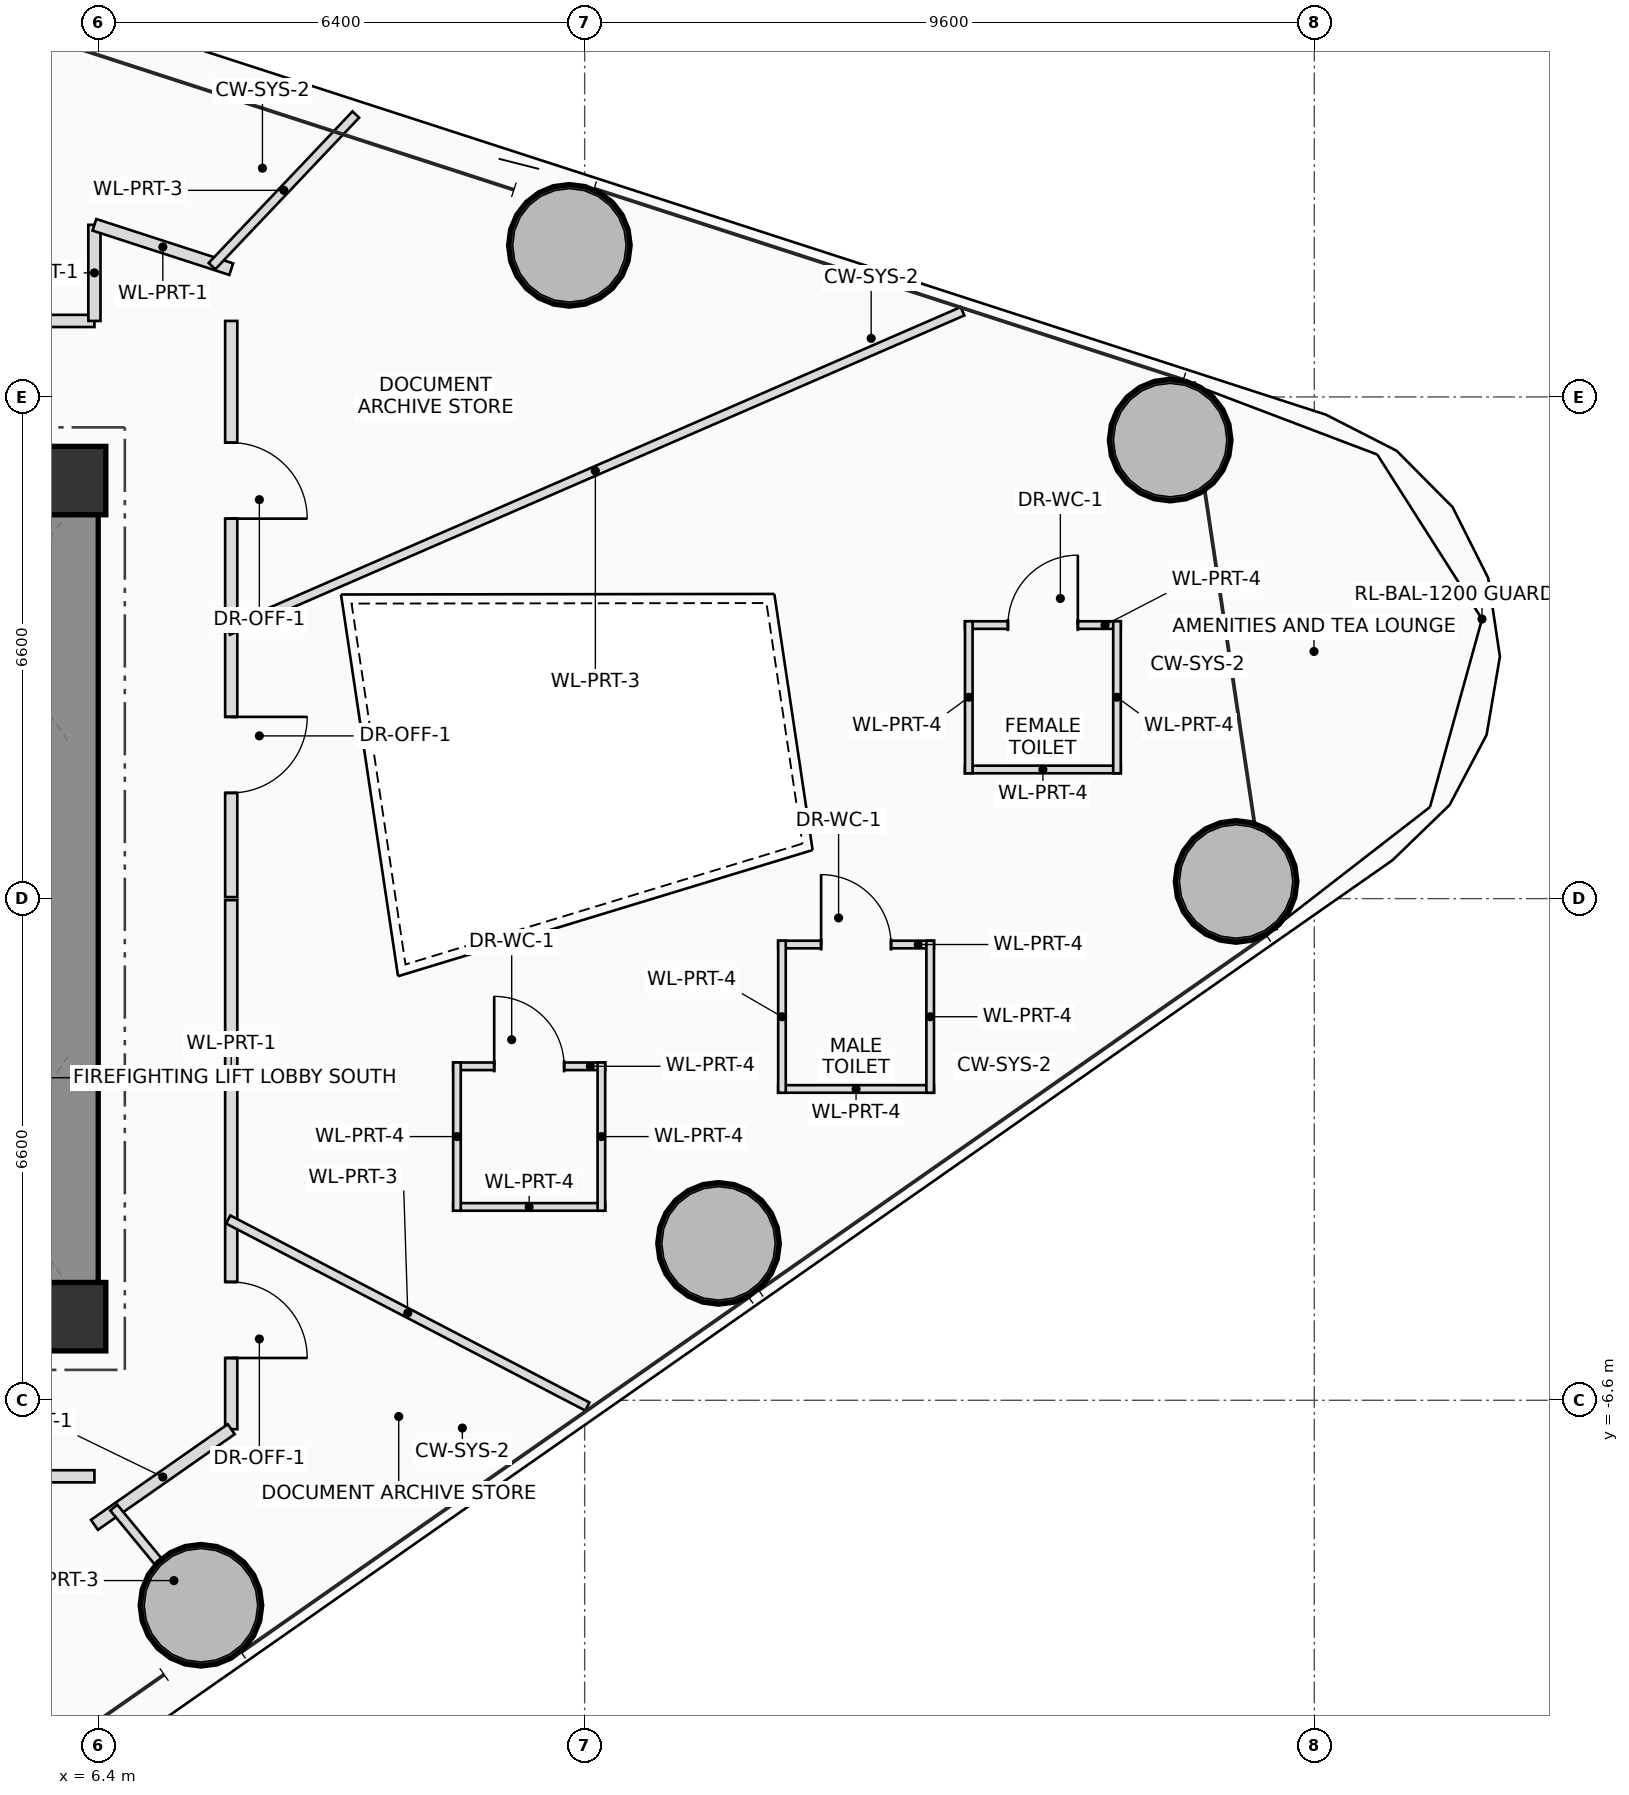
"""IFC4 building model, lengths in metres.
Left out: names, types, materials, properties, quantities, classifications, styles, units other than length and angle.
Written with IfcOpenShell. Run it as: python <this file> out.ifc"""

import sys

from ifc_helpers import new_model, si_unit, direction, frame, frame_2d, origin, origin_2d, place, context, subcontext, project, spatial, rectangle, hollow_circle, extrude, source, transform, mapped, element, fill, save


model = new_model("IFC4")
c1 = context("Model", 3, precision=1e-05, world=origin(), true_north=direction((0.0, 1.0)))
c2 = subcontext(c1, "Body", "Model", "MODEL_VIEW")
j1 = project(units=[si_unit("LENGTHUNIT", "METRE"), si_unit("PLANEANGLEUNIT", "RADIAN")], contexts=[c1])
p1 = place(None, origin())
s1 = spatial("IfcSite", under=j1, at=p1, CompositionType="ELEMENT")
p2 = place(p1, origin())
s2 = spatial("IfcBuilding", under=s1, at=p2, CompositionType="ELEMENT")
p3 = place(p2, frame((0.0, 0.0, 81.05)))
s3 = spatial("IfcBuildingStorey", under=s2, at=p3, CompositionType="ELEMENT", Elevation=81.05)
m1 = source(origin(), c2, "Body", "SweptSolid", [
    extrude(rectangle(XDim=0.9, YDim=0.9, at=origin_2d()), origin(), (0.0, 0.0, 1.0), 3.75),
])
for number, where, z_axis, x_axis in (
    (1, (6.05, -5.5, 0.0), (0.0, 0.0, 1.0), (1.0, 0.0, 0.0)),
    (2, (6.05, 5.5, 0.0), (0.0, 0.0, 1.0), (1.0, 0.0, 0.0)),
):
    element("IfcColumn", number, at=place(p3, frame(where, z_axis=z_axis, x_axis=x_axis)), inside=s3, PredefinedType="COLUMN", context=c2, shape_type="MappedRepresentation", body=[
        mapped(m1, transform((0.0, 0.0, 0.0), scale=1.0)),
    ])
p4 = place(p3, frame((-6.4, 5.475, 0.0), z_axis=(0.0, 0.0, 1.0), x_axis=(1.0, 0.0, 0.0)))
e3 = element("IfcWall", 3, at=p4, inside=s3, PredefinedType="SHEAR", context=c2, shape_type="SweptSolid", body=[
    extrude(rectangle(XDim=12.8, YDim=0.75, at=frame_2d((6.4, 0.0))), origin(), (0.0, 0.0, 1.0), 3.75),
])
p5 = place(p4, frame((8.6, 0.0, 0.0)))
e4 = element("IfcOpeningElement", 4, at=p5, cuts=e3, PredefinedType="OPENING", context=c2, shape_type="SweptSolid", body=[
    extrude(rectangle(XDim=1.2, YDim=2.2, at=frame_2d((0.6, 1.1))), frame((0.0, 0.385, 0.0), z_axis=(0.0, -1.0, 0.0), x_axis=(1.0, 0.0, 0.0)), (0.0, 0.0, 1.0), 0.77),
])
p6 = place(p3, frame((-6.4, -5.475, 0.0), z_axis=(0.0, 0.0, 1.0), x_axis=(1.0, 0.0, 0.0)))
e5 = element("IfcWall", 5, at=p6, inside=s3, PredefinedType="SHEAR", context=c2, shape_type="SweptSolid", body=[
    extrude(rectangle(XDim=12.8, YDim=0.75, at=frame_2d((6.4, 0.0))), origin(), (0.0, 0.0, 1.0), 3.75),
])
p7 = place(p6, frame((8.6, 0.0, 0.0)))
e6 = element("IfcOpeningElement", 6, at=p7, cuts=e5, PredefinedType="OPENING", context=c2, shape_type="SweptSolid", body=[
    extrude(rectangle(XDim=1.2, YDim=2.2, at=frame_2d((0.6, 1.1))), frame((0.0, 0.385, 0.0), z_axis=(0.0, -1.0, 0.0), x_axis=(1.0, 0.0, 0.0)), (0.0, 0.0, 1.0), 0.77),
])
p8 = place(p3, frame((6.025, -5.1, 0.0), z_axis=(0.0, 0.0, 1.0), x_axis=(0.0, 1.0, 0.0)))
e7 = element("IfcWall", 7, at=p8, inside=s3, PredefinedType="SHEAR", context=c2, shape_type="SweptSolid", body=[
    extrude(rectangle(XDim=10.2, YDim=0.75, at=frame_2d((5.1, 0.0))), origin(), (0.0, 0.0, 1.0), 3.75),
])
m2 = source(origin(), c2, "Body", "SweptSolid", [
    extrude(hollow_circle(Radius=0.8, WallThickness=0.055, at=origin_2d()), origin(), (0.0, 0.0, 1.0), 3.75),
])
for number, where, z_axis, x_axis in (
    (8, (7.752, -9.297, 0.0), (0.0, 0.0, 1.0), (1.0, 0.0, 0.0)),
    (9, (14.562, -4.535, 0.0), (0.0, 0.0, 1.0), (1.0, 0.0, 0.0)),
    (10, (21.371, 0.226, 0.0), (0.0, 0.0, 1.0), (1.0, 0.0, 0.0)),
    (11, (20.503, 6.032, 0.0), (0.0, 0.0, 1.0), (1.0, 0.0, 0.0)),
    (12, (12.599, 8.594, 0.0), (0.0, 0.0, 1.0), (1.0, 0.0, 0.0)),
):
    element("IfcColumn", number, at=place(p3, frame(where, z_axis=z_axis, x_axis=x_axis)), inside=s3, PredefinedType="COLUMN", context=c2, shape_type="MappedRepresentation", body=[
        mapped(m2, transform((0.0, 0.0, 0.0), scale=1.0)),
    ])
p9 = place(p3, frame((15.346, -0.604, 0.0), z_axis=(0.0, 0.0, 1.0), x_axis=(1.0, 0.0, 0.0)))
e13 = element("IfcWall", 13, at=p9, inside=s3, PredefinedType="PARTITIONING", context=c2, shape_type="SweptSolid", body=[
    extrude(rectangle(XDim=2.05, YDim=0.1, at=frame_2d((1.025, 0.0))), origin(), (0.0, 0.0, 1.0), 3.51),
])
p10 = place(p9, frame((0.565, 0.0, 0.0)))
e14 = element("IfcOpeningElement", 14, at=p10, cuts=e13, PredefinedType="OPENING", context=c2, shape_type="SweptSolid", body=[
    extrude(rectangle(XDim=0.92, YDim=2.1, at=frame_2d((0.46, 1.05))), frame((0.0, 0.06, 0.0), z_axis=(0.0, -1.0, 0.0), x_axis=(1.0, 0.0, 0.0)), (0.0, 0.0, 1.0), 0.12),
])
p11 = place(p3, frame((17.396, -2.504, 0.0), z_axis=(0.0, 0.0, 1.0), x_axis=(-1.0, 0.0, 0.0)))
e15 = element("IfcWall", 15, at=p11, inside=s3, PredefinedType="PARTITIONING", context=c2, shape_type="SweptSolid", body=[
    extrude(rectangle(XDim=2.05, YDim=0.1, at=frame_2d((1.025, 0.0))), origin(), (0.0, 0.0, 1.0), 2.975),
])
p12 = place(p3, frame((17.346, -0.554, 0.0), z_axis=(0.0, 0.0, 1.0), x_axis=(0.0, -1.0, 0.0)))
e16 = element("IfcWall", 16, at=p12, inside=s3, PredefinedType="PARTITIONING", context=c2, shape_type="SweptSolid", body=[
    extrude(rectangle(XDim=2.0, YDim=0.1, at=frame_2d((1.0, 0.0))), origin(), (0.0, 0.0, 1.0), 2.975),
])
p13 = place(p3, frame((15.396, -2.554, 0.0), z_axis=(0.0, 0.0, 1.0), x_axis=(0.0, 1.0, 0.0)))
e17 = element("IfcWall", 17, at=p13, inside=s3, PredefinedType="PARTITIONING", context=c2, shape_type="SweptSolid", body=[
    extrude(rectangle(XDim=2.0, YDim=0.1, at=frame_2d((1.0, 0.0))), origin(), (0.0, 0.0, 1.0), 3.51),
])
p14 = place(p3, frame((17.804, 3.599, 0.0), z_axis=(0.0, 0.0, 1.0), x_axis=(1.0, 0.0, 0.0)))
e18 = element("IfcWall", 18, at=p14, inside=s3, PredefinedType="PARTITIONING", context=c2, shape_type="SweptSolid", body=[
    extrude(rectangle(XDim=2.05, YDim=0.1, at=frame_2d((1.025, 0.0))), origin(), (0.0, 0.0, 1.0), 3.51),
])
p15 = place(p14, frame((0.565, 0.0, 0.0)))
e19 = element("IfcOpeningElement", 19, at=p15, cuts=e18, PredefinedType="OPENING", context=c2, shape_type="SweptSolid", body=[
    extrude(rectangle(XDim=0.92, YDim=2.1, at=frame_2d((0.46, 1.05))), frame((0.0, 0.06, 0.0), z_axis=(0.0, -1.0, 0.0), x_axis=(1.0, 0.0, 0.0)), (0.0, 0.0, 1.0), 0.12),
])
p16 = place(p3, frame((19.854, 1.699, 0.0), z_axis=(0.0, 0.0, 1.0), x_axis=(-1.0, 0.0, 0.0)))
e20 = element("IfcWall", 20, at=p16, inside=s3, PredefinedType="PARTITIONING", context=c2, shape_type="SweptSolid", body=[
    extrude(rectangle(XDim=2.05, YDim=0.1, at=frame_2d((1.025, 0.0))), origin(), (0.0, 0.0, 1.0), 3.51),
])
for number, where, z_axis, x_axis in (
    (21, (19.804, 3.649, 0.0), (0.0, 0.0, 1.0), (0.0, -1.0, 0.0)),
    (22, (17.854, 1.649, 0.0), (0.0, 0.0, 1.0), (0.0, 1.0, 0.0)),
):
    element("IfcWall", number, at=place(p3, frame(where, z_axis=z_axis, x_axis=x_axis)), inside=s3, PredefinedType="PARTITIONING", context=c2, shape_type="SweptSolid", body=[
        extrude(rectangle(XDim=2.0, YDim=0.1, at=frame_2d((1.0, 0.0))), origin(), (0.0, 0.0, 1.0), 3.51),
    ])
p17 = place(p3, frame((11.07, -2.206, 0.0), z_axis=(0.0, 0.0, 1.0), x_axis=(1.0, 0.0, 0.0)))
e23 = element("IfcWall", 23, at=p17, inside=s3, PredefinedType="PARTITIONING", context=c2, shape_type="SweptSolid", body=[
    extrude(rectangle(XDim=2.0, YDim=0.1, at=frame_2d((1.0, 0.0))), origin(), (0.0, 0.0, 1.0), 3.015),
])
p18 = place(p17, frame((0.54, 0.0, 0.0)))
e24 = element("IfcOpeningElement", 24, at=p18, cuts=e23, PredefinedType="OPENING", context=c2, shape_type="SweptSolid", body=[
    extrude(rectangle(XDim=0.92, YDim=2.1, at=frame_2d((0.46, 1.05))), frame((0.0, 0.06, 0.0), z_axis=(0.0, -1.0, 0.0), x_axis=(1.0, 0.0, 0.0)), (0.0, 0.0, 1.0), 0.12),
])
p19 = place(p3, frame((13.07, -4.056, 0.0), z_axis=(0.0, 0.0, 1.0), x_axis=(-1.0, 0.0, 0.0)))
e25 = element("IfcWall", 25, at=p19, inside=s3, PredefinedType="PARTITIONING", context=c2, shape_type="SweptSolid", body=[
    extrude(rectangle(XDim=2.0, YDim=0.1, at=frame_2d((1.0, 0.0))), origin(), (0.0, 0.0, 1.0), 3.165),
])
p20 = place(p3, frame((13.02, -2.156, 0.0), z_axis=(0.0, 0.0, 1.0), x_axis=(0.0, -1.0, 0.0)))
e26 = element("IfcWall", 26, at=p20, inside=s3, PredefinedType="PARTITIONING", context=c2, shape_type="SweptSolid", body=[
    extrude(rectangle(XDim=1.95, YDim=0.1, at=frame_2d((0.975, 0.0))), origin(), (0.0, 0.0, 1.0), 3.165),
])
p21 = place(p3, frame((11.12, -4.106, 0.0), z_axis=(0.0, 0.0, 1.0), x_axis=(0.0, 1.0, 0.0)))
e27 = element("IfcWall", 27, at=p21, inside=s3, PredefinedType="PARTITIONING", context=c2, shape_type="SweptSolid", body=[
    extrude(rectangle(XDim=1.95, YDim=0.1, at=frame_2d((0.975, 0.0))), origin(), (0.0, 0.0, 1.0), 3.015),
])
p22 = place(p3, frame((-6.35, 7.6, 0.0), z_axis=(0.0, 0.0, 1.0), x_axis=(1.0, 0.0, 0.0)))
e28 = element("IfcWall", 28, at=p22, inside=s3, PredefinedType="PARTITIONING", context=c2, shape_type="SweptSolid", body=[
    extrude(rectangle(XDim=12.7, YDim=0.16, at=frame_2d((6.35, 0.0))), origin(), (0.0, 0.0, 1.0), 2.815),
])
p23 = place(p22, frame((8.629, 0.0, 0.0)))
e29 = element("IfcOpeningElement", 29, at=p23, cuts=e28, PredefinedType="OPENING", context=c2, shape_type="SweptSolid", body=[
    extrude(rectangle(XDim=1.0, YDim=2.25, at=frame_2d((0.5, 1.125))), frame((0.0, 0.09, 0.0), z_axis=(0.0, -1.0, 0.0), x_axis=(1.0, 0.0, 0.0)), (0.0, 0.0, 1.0), 0.18),
])
p24 = place(p3, frame((6.35, 7.6, 0.0), z_axis=(0.0, 0.0, 1.0), x_axis=(0.0, 1.0, 0.0)))
e30 = element("IfcWall", 30, at=p24, inside=s3, PredefinedType="PARTITIONING", context=c2, shape_type="SweptSolid", body=[
    extrude(rectangle(XDim=1.265, YDim=0.16, at=frame_2d((0.632, 0.0))), origin(), (0.0, 0.0, 1.0), 3.015),
])
p25 = place(p3, frame((6.35, 8.865, 0.0), z_axis=(0.0, 0.0, 1.0), x_axis=(0.951257609277, -0.30839740724, 0.0)))
e31 = element("IfcWall", 31, at=p25, inside=s3, PredefinedType="PARTITIONING", context=c2, shape_type="SweptSolid", body=[
    extrude(rectangle(XDim=1.892, YDim=0.16, at=frame_2d((0.946, 0.0))), origin(), (0.0, 0.0, 1.0), 3.165),
])
p26 = place(p3, frame((8.15, 7.6, 0.0), z_axis=(0.0, 0.0, 1.0), x_axis=(0.0, -1.0, 0.0)))
e32 = element("IfcWall", 32, at=p26, inside=s3, PredefinedType="PARTITIONING", context=c2, shape_type="SweptSolid", body=[
    extrude(rectangle(XDim=7.58, YDim=0.16, at=frame_2d((3.79, 0.0))), origin(), (0.0, 0.0, 1.0), 2.815),
])
p27 = place(p26, frame((1.601, 0.0, 0.0)))
e33 = element("IfcOpeningElement", 33, at=p27, cuts=e32, PredefinedType="OPENING", context=c2, shape_type="SweptSolid", body=[
    extrude(rectangle(XDim=1.0, YDim=2.25, at=frame_2d((0.5, 1.125))), frame((0.0, 0.09, 0.0), z_axis=(0.0, -1.0, 0.0), x_axis=(1.0, 0.0, 0.0)), (0.0, 0.0, 1.0), 0.18),
])
p28 = place(p26, frame((5.209, 0.0, 0.0)))
e34 = element("IfcOpeningElement", 34, at=p28, cuts=e32, PredefinedType="OPENING", context=c2, shape_type="SweptSolid", body=[
    extrude(rectangle(XDim=1.0, YDim=2.25, at=frame_2d((0.5, 1.125))), frame((0.0, 0.09, 0.0), z_axis=(0.0, -1.0, 0.0), x_axis=(1.0, 0.0, 0.0)), (0.0, 0.0, 1.0), 0.18),
])
p29 = place(p3, frame((8.15, -0.02, 0.0), z_axis=(0.0, 0.0, 1.0), x_axis=(0.0, -1.0, 0.0)))
e35 = element("IfcWall", 35, at=p29, inside=s3, PredefinedType="PARTITIONING", context=c2, shape_type="SweptSolid", body=[
    extrude(rectangle(XDim=6.96, YDim=0.16, at=frame_2d((3.48, 0.0))), origin(), (0.0, 0.0, 1.0), 2.815),
])
p30 = place(p29, frame((5.023, 0.0, 0.0)))
e36 = element("IfcOpeningElement", 36, at=p30, cuts=e35, PredefinedType="OPENING", context=c2, shape_type="SweptSolid", body=[
    extrude(rectangle(XDim=1.0, YDim=2.25, at=frame_2d((0.5, 1.125))), frame((0.0, 0.09, 0.0), z_axis=(0.0, -1.0, 0.0), x_axis=(1.0, 0.0, 0.0)), (0.0, 0.0, 1.0), 0.18),
])
p31 = place(p3, frame((8.15, -6.98, 0.0), z_axis=(0.0, 0.0, 1.0), x_axis=(-0.819513839239, -0.573059392468, 0.0)))
e37 = element("IfcWall", 37, at=p31, inside=s3, PredefinedType="PARTITIONING", context=c2, shape_type="SweptSolid", body=[
    extrude(rectangle(XDim=2.196, YDim=0.16, at=frame_2d((1.098, 0.0))), origin(), (0.0, 0.0, 1.0), 2.815),
])
p32 = place(p3, frame((6.35, -7.6, 0.0), z_axis=(0.0, 0.0, 1.0), x_axis=(-1.0, 0.0, 0.0)))
e38 = element("IfcWall", 38, at=p32, inside=s3, PredefinedType="PARTITIONING", context=c2, shape_type="SweptSolid", body=[
    extrude(rectangle(XDim=12.7, YDim=0.16, at=frame_2d((6.35, 0.0))), origin(), (0.0, 0.0, 1.0), 2.815),
])
p33 = place(p32, frame((2.937, 0.0, 0.0)))
e39 = element("IfcOpeningElement", 39, at=p33, cuts=e38, PredefinedType="OPENING", context=c2, shape_type="SweptSolid", body=[
    extrude(rectangle(XDim=1.0, YDim=2.25, at=frame_2d((0.5, 1.125))), frame((0.0, 0.09, 0.0), z_axis=(0.0, -1.0, 0.0), x_axis=(1.0, 0.0, 0.0)), (0.0, 0.0, 1.0), 0.18),
])
p34 = place(p3, frame((6.605, -8.012, 0.0), z_axis=(0.0, 0.0, 1.0), x_axis=(0.636033986145, -0.771661045064, 0.0)))
e40 = element("IfcWall", 40, at=p34, inside=s3, PredefinedType="PARTITIONING", context=c2, shape_type="SweptSolid", body=[
    extrude(rectangle(XDim=2.488, YDim=0.12, at=frame_2d((1.244, 0.0))), origin(), (0.0, 0.0, 1.0), 3.51),
])
p35 = place(p3, frame((8.11, -4.222, 0.0), z_axis=(0.0, 0.0, 1.0), x_axis=(0.886984089822, -0.461799983112, 0.0)))
e41 = element("IfcWall", 41, at=p35, inside=s3, PredefinedType="PARTITIONING", context=c2, shape_type="SweptSolid", body=[
    extrude(rectangle(XDim=5.327, YDim=0.12, at=frame_2d((2.664, 0.0))), origin(), (0.0, 0.0, 1.0), 2.815),
])
p36 = place(p3, frame((8.11, 3.526, 0.0), z_axis=(0.0, 0.0, 1.0), x_axis=(0.917062319349, 0.398743905823, 0.0)))
e42 = element("IfcWall", 42, at=p36, inside=s3, PredefinedType="PARTITIONING", context=c2, shape_type="SweptSolid", body=[
    extrude(rectangle(XDim=10.535, YDim=0.12, at=frame_2d((5.268, 0.0))), origin(), (0.0, 0.0, 1.0), 2.815),
])
p37 = place(p3, frame((7.897, 8.321, 0.0), z_axis=(0.0, 0.0, 1.0), x_axis=(0.688345527251, 0.725382957556, 0.0)))
e43 = element("IfcWall", 43, at=p37, inside=s3, PredefinedType="PARTITIONING", context=c2, shape_type="SweptSolid", body=[
    extrude(rectangle(XDim=2.749, YDim=0.12, at=frame_2d((1.375, 0.0))), origin(), (0.0, 0.0, 1.0), 2.975),
])
p38 = place(p10, origin())
e44 = element("IfcDoor", 44, at=p38, inside=s3, OperationType="SINGLE_SWING_LEFT", PredefinedType="DOOR", context=c2, shape_type="SweptSolid", body=[
    extrude(rectangle(XDim=0.92, YDim=2.1, at=frame_2d((0.46, 1.05))), frame((0.0, 0.025, 0.0), z_axis=(0.0, -1.0, 0.0), x_axis=(1.0, 0.0, 0.0)), (0.0, 0.0, 1.0), 0.05),
])
fill(e14, e44)
p39 = place(p15, origin())
e45 = element("IfcDoor", 45, at=p39, inside=s3, OperationType="SINGLE_SWING_RIGHT", PredefinedType="DOOR", context=c2, shape_type="SweptSolid", body=[
    extrude(rectangle(XDim=0.92, YDim=2.1, at=frame_2d((0.46, 1.05))), frame((0.0, 0.025, 0.0), z_axis=(0.0, -1.0, 0.0), x_axis=(1.0, 0.0, 0.0)), (0.0, 0.0, 1.0), 0.05),
])
fill(e19, e45)
p40 = place(p18, origin())
e46 = element("IfcDoor", 46, at=p40, inside=s3, OperationType="SINGLE_SWING_LEFT", PredefinedType="DOOR", context=c2, shape_type="SweptSolid", body=[
    extrude(rectangle(XDim=0.92, YDim=2.1, at=frame_2d((0.46, 1.05))), frame((0.0, 0.025, 0.0), z_axis=(0.0, -1.0, 0.0), x_axis=(1.0, 0.0, 0.0)), (0.0, 0.0, 1.0), 0.05),
])
fill(e24, e46)
p41 = place(p27, origin())
e47 = element("IfcDoor", 47, at=p41, inside=s3, OperationType="SINGLE_SWING_RIGHT", PredefinedType="DOOR", context=c2, shape_type="SweptSolid", body=[
    extrude(rectangle(XDim=1.0, YDim=2.25, at=frame_2d((0.5, 1.125))), frame((0.0, 0.025, 0.0), z_axis=(0.0, -1.0, 0.0), x_axis=(1.0, 0.0, 0.0)), (0.0, 0.0, 1.0), 0.05),
])
fill(e33, e47)
p42 = place(p28, origin())
e48 = element("IfcDoor", 48, at=p42, inside=s3, OperationType="SINGLE_SWING_LEFT", PredefinedType="DOOR", context=c2, shape_type="SweptSolid", body=[
    extrude(rectangle(XDim=1.0, YDim=2.25, at=frame_2d((0.5, 1.125))), frame((0.0, 0.025, 0.0), z_axis=(0.0, -1.0, 0.0), x_axis=(1.0, 0.0, 0.0)), (0.0, 0.0, 1.0), 0.05),
])
fill(e34, e48)
p43 = place(p30, origin())
e49 = element("IfcDoor", 49, at=p43, inside=s3, OperationType="SINGLE_SWING_RIGHT", PredefinedType="DOOR", context=c2, shape_type="SweptSolid", body=[
    extrude(rectangle(XDim=1.0, YDim=2.25, at=frame_2d((0.5, 1.125))), frame((0.0, 0.025, 0.0), z_axis=(0.0, -1.0, 0.0), x_axis=(1.0, 0.0, 0.0)), (0.0, 0.0, 1.0), 0.05),
])
fill(e36, e49)
save(model, sys.argv[1])
